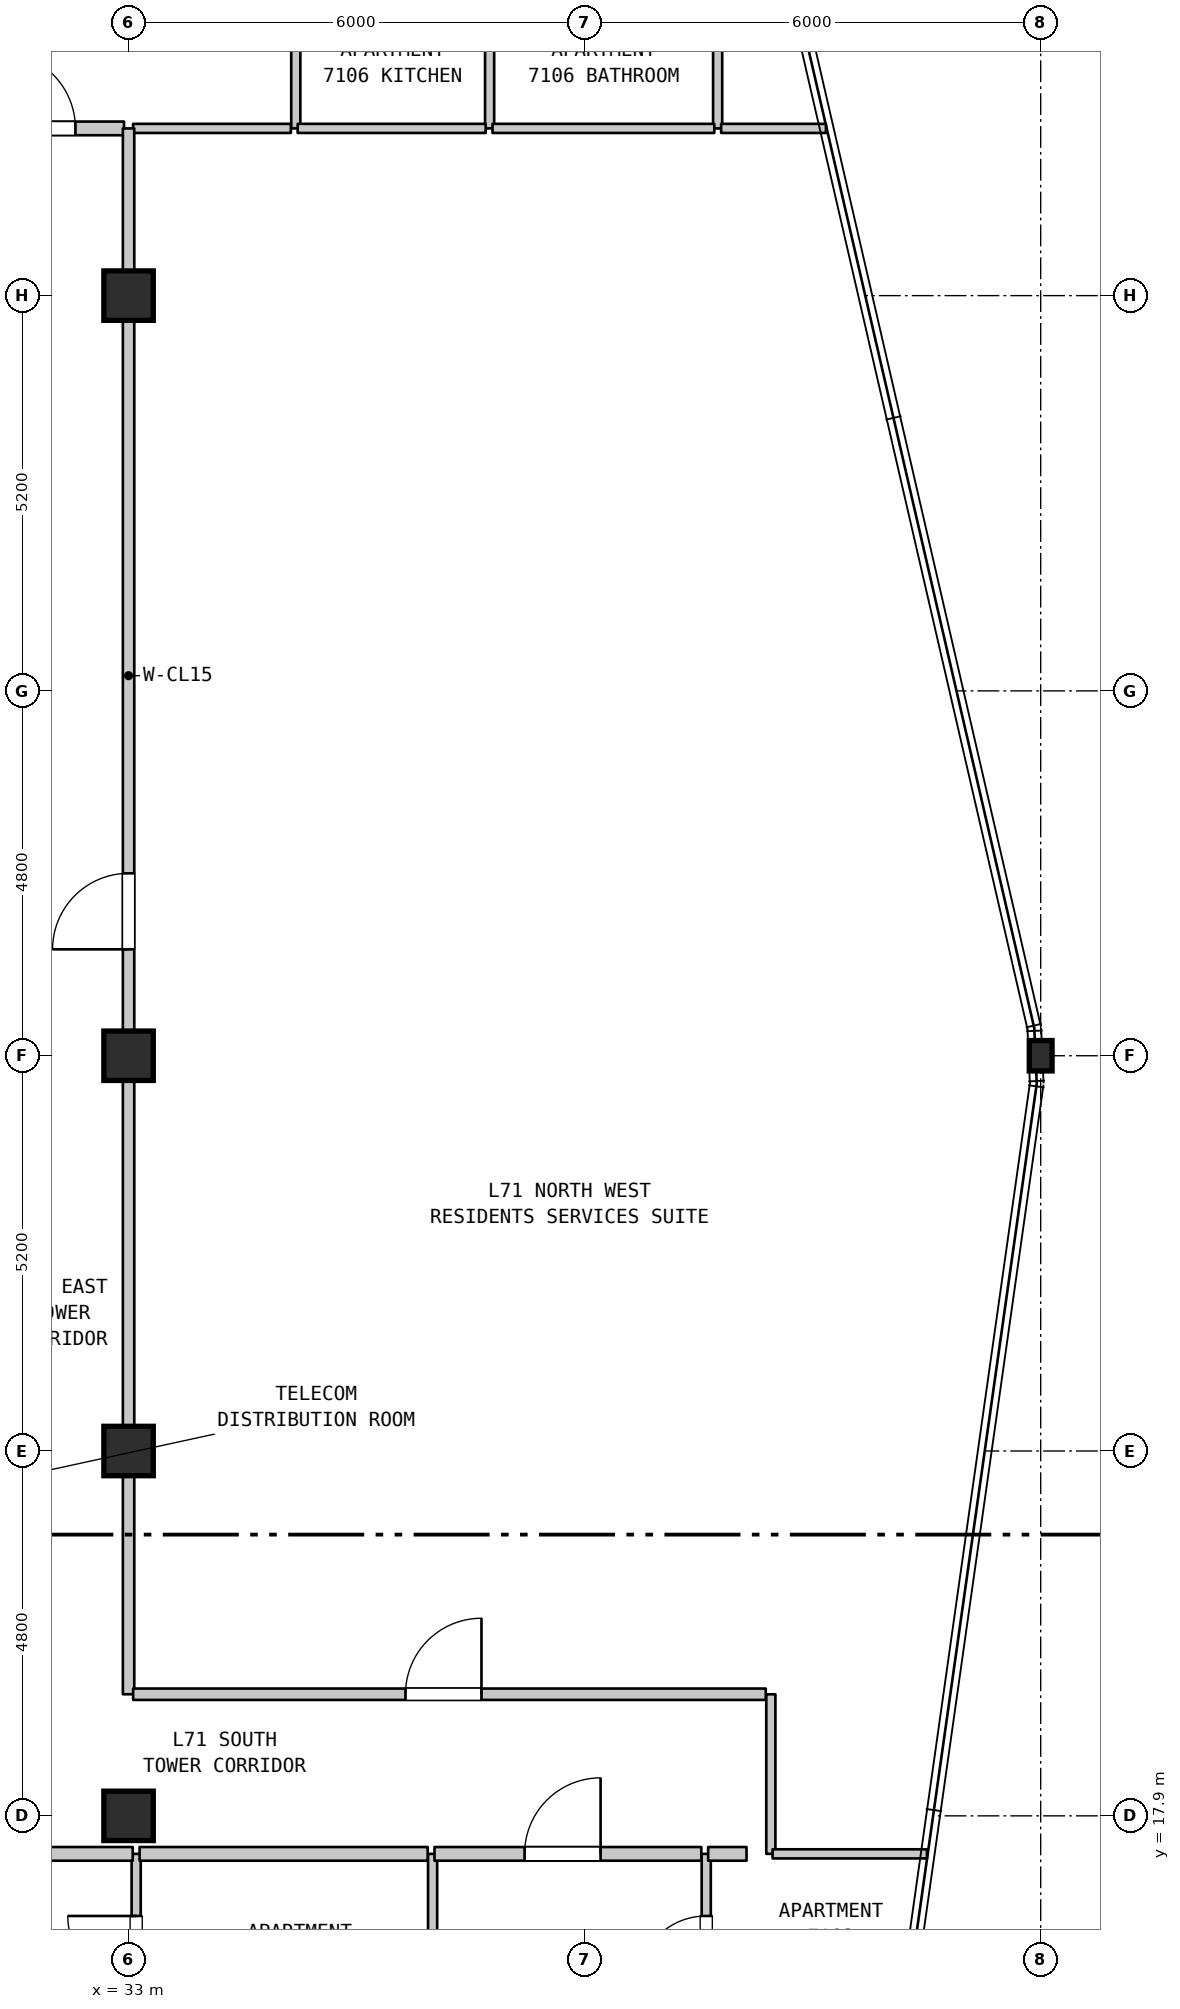
"""IFC4 building model, lengths in metres.
Left out: names, types, materials, properties, quantities, classifications, styles, units other than length and angle.
Written with IfcOpenShell. Run it as: python <this file> out.ifc"""

import sys

from ifc_helpers import new_model, si_unit, direction, frame, frame_2d, origin, origin_2d, place, context, subcontext, project, spatial, rectangle, i_section, extrude, element, fill, save


model = new_model("IFC4")
c1 = context("Model", 3, precision=1e-05, world=origin(), true_north=direction((0.0, 1.0)))
c2 = subcontext(c1, "Body", "Model", "MODEL_VIEW")
j1 = project(units=[si_unit("LENGTHUNIT", "METRE"), si_unit("PLANEANGLEUNIT", "RADIAN")], contexts=[c1])
p1 = place(None, origin())
s1 = spatial("IfcSite", under=j1, at=p1, CompositionType="ELEMENT")
p2 = place(p1, origin())
s2 = spatial("IfcBuilding", under=s1, at=p2, CompositionType="ELEMENT")
p3 = place(p2, frame((0.0, 0.0, 284.3)))
s3 = spatial("IfcBuildingStorey", under=s2, at=p3, CompositionType="ELEMENT", Elevation=284.3)
for number, where, z_axis, x_axis in (
    (1, (33.0, 17.9, 0.0), (0.0, 0.0, 1.0), (1.0, 0.0, 0.0)),
    (2, (33.0, 22.7, 0.0), (0.0, 0.0, 1.0), (1.0, 0.0, 0.0)),
    (3, (33.0, 27.9, 0.0), (0.0, 0.0, 1.0), (1.0, 0.0, 0.0)),
    (4, (33.0, 37.9, 0.0), (0.0, 0.0, 1.0), (1.0, 0.0, 0.0)),
):
    element("IfcColumn", number, at=place(p3, frame(where, z_axis=z_axis, x_axis=x_axis)), inside=s3, PredefinedType="COLUMN", context=c2, shape_type="SweptSolid", body=[
        extrude(rectangle(XDim=0.65, YDim=0.65, at=origin_2d()), origin(), (0.0, 0.0, 1.0), 3.7),
    ])
p4 = place(p3, frame((45.0, 27.9, 0.0), z_axis=(0.0, 0.0, 1.0), x_axis=(1.0, 0.0, 0.0)))
e5 = element("IfcColumn", 5, at=p4, inside=s3, PredefinedType="COLUMN", context=c2, shape_type="SweptSolid", body=[
    extrude(i_section(OverallWidth=0.3, OverallDepth=0.4, WebThickness=0.013, FlangeThickness=0.024, FilletRadius=0.027, at=origin_2d()), origin(), (0.0, 0.0, 1.0), 3.7),
])
p5 = place(p3, frame((33.0, 19.5, 0.0), z_axis=(0.0, 0.0, 1.0), x_axis=(0.0, 1.0, 0.0)))
e6 = element("IfcWall", 6, at=p5, inside=s3, PredefinedType="STANDARD", context=c2, shape_type="SweptSolid", body=[
    extrude(rectangle(XDim=8.4, YDim=0.15, at=frame_2d((4.2, 0.0))), origin(), (0.0, 0.0, 1.0), 3.1),
])
p6 = place(p3, frame((33.1, 15.008, 0.0), z_axis=(0.0, 0.0, 1.0), x_axis=(0.0, 1.0, 0.0)))
e7 = element("IfcWall", 7, at=p6, inside=s3, PredefinedType="PARTITIONING", context=c2, shape_type="SweptSolid", body=[
    extrude(rectangle(XDim=2.392, YDim=0.12, at=frame_2d((1.196, 0.0))), origin(), (0.0, 0.0, 1.0), 3.1),
])
p7 = place(p6, frame((0.675, 0.0, 0.0)))
e8 = element("IfcOpeningElement", 8, at=p7, cuts=e7, PredefinedType="OPENING", context=c2, shape_type="SweptSolid", body=[
    extrude(rectangle(XDim=0.9, YDim=2.1, at=frame_2d((0.45, 1.05))), frame((0.0, 0.07, 0.0), z_axis=(0.0, -1.0, 0.0), x_axis=(1.0, 0.0, 0.0)), (0.0, 0.0, 1.0), 0.14),
])
p8 = place(p3, frame((35.2, 40.1, 0.0), z_axis=(0.0, 0.0, 1.0), x_axis=(0.0, 1.0, 0.0)))
e9 = element("IfcWall", 9, at=p8, inside=s3, PredefinedType="PARTITIONING", context=c2, shape_type="SweptSolid", body=[
    extrude(rectangle(XDim=2.3, YDim=0.12, at=frame_2d((1.15, 0.0))), origin(), (0.0, 0.0, 1.0), 3.39),
])
p9 = place(p3, frame((37.0, 15.008, 0.0), z_axis=(0.0, 0.0, 1.0), x_axis=(0.0, 1.0, 0.0)))
e10 = element("IfcWall", 10, at=p9, inside=s3, PredefinedType="PARTITIONING", context=c2, shape_type="SweptSolid", body=[
    extrude(rectangle(XDim=2.392, YDim=0.12, at=frame_2d((1.196, 0.0))), origin(), (0.0, 0.0, 1.0), 3.39),
])
p10 = place(p3, frame((37.75, 40.1, 0.0), z_axis=(0.0, 0.0, 1.0), x_axis=(0.0, 1.0, 0.0)))
e11 = element("IfcWall", 11, at=p10, inside=s3, PredefinedType="PARTITIONING", context=c2, shape_type="SweptSolid", body=[
    extrude(rectangle(XDim=2.3, YDim=0.12, at=frame_2d((1.15, 0.0))), origin(), (0.0, 0.0, 1.0), 3.39),
])
p11 = place(p3, frame((40.6, 15.008, 0.0), z_axis=(0.0, 0.0, 1.0), x_axis=(0.0, 1.0, 0.0)))
e12 = element("IfcWall", 12, at=p11, inside=s3, PredefinedType="PARTITIONING", context=c2, shape_type="SweptSolid", body=[
    extrude(rectangle(XDim=2.392, YDim=0.12, at=frame_2d((1.196, 0.0))), origin(), (0.0, 0.0, 1.0), 3.39),
])
p12 = place(p11, frame((0.675, 0.0, 0.0)))
e13 = element("IfcOpeningElement", 13, at=p12, cuts=e12, PredefinedType="OPENING", context=c2, shape_type="SweptSolid", body=[
    extrude(rectangle(XDim=0.9, YDim=2.1, at=frame_2d((0.45, 1.05))), frame((0.0, 0.07, 0.0), z_axis=(0.0, -1.0, 0.0), x_axis=(1.0, 0.0, 0.0)), (0.0, 0.0, 1.0), 0.14),
])
p13 = place(p3, frame((40.75, 40.1, 0.0), z_axis=(0.0, 0.0, 1.0), x_axis=(0.0, 1.0, 0.0)))
e14 = element("IfcWall", 14, at=p13, inside=s3, PredefinedType="PARTITIONING", context=c2, shape_type="SweptSolid", body=[
    extrude(rectangle(XDim=2.3, YDim=0.12, at=frame_2d((1.15, 0.0))), origin(), (0.0, 0.0, 1.0), 3.39),
])
p14 = place(p3, frame((41.45, 17.4, 0.0), z_axis=(0.0, 0.0, 1.0), x_axis=(0.0, 1.0, 0.0)))
e15 = element("IfcWall", 15, at=p14, inside=s3, PredefinedType="PARTITIONING", context=c2, shape_type="SweptSolid", body=[
    extrude(rectangle(XDim=2.099, YDim=0.12, at=frame_2d((1.05, 0.0))), origin(), (0.0, 0.0, 1.0), 3.39),
])
p15 = place(p3, frame((29.545, 17.4, 0.0), z_axis=(0.0, 0.0, 1.0), x_axis=(1.0, 0.0, 0.0)))
e16 = element("IfcWall", 16, at=p15, inside=s3, PredefinedType="STANDARD", context=c2, shape_type="SweptSolid", body=[
    extrude(rectangle(XDim=3.51, YDim=0.18, at=frame_2d((1.755, 0.0))), origin(), (0.0, 0.0, 1.0), 3.39),
])
p16 = place(p15, frame((1.185, 0.0, 0.0)))
e17 = element("IfcOpeningElement", 17, at=p16, cuts=e16, PredefinedType="OPENING", context=c2, shape_type="SweptSolid", body=[
    extrude(rectangle(XDim=1.0, YDim=2.15, at=frame_2d((0.5, 1.075))), frame((0.0, 0.1, 0.0), z_axis=(0.0, -1.0, 0.0), x_axis=(1.0, 0.0, 0.0)), (0.0, 0.0, 1.0), 0.2),
])
p17 = place(p3, frame((33.145, 17.4, 0.0), z_axis=(0.0, 0.0, 1.0), x_axis=(1.0, 0.0, 0.0)))
e18 = element("IfcWall", 18, at=p17, inside=s3, PredefinedType="STANDARD", context=c2, shape_type="SweptSolid", body=[
    extrude(rectangle(XDim=3.79, YDim=0.18, at=frame_2d((1.895, 0.0))), origin(), (0.0, 0.0, 1.0), 3.39),
])
p18 = place(p3, frame((37.025, 17.4, 0.0), z_axis=(0.0, 0.0, 1.0), x_axis=(1.0, 0.0, 0.0)))
e19 = element("IfcWall", 19, at=p18, inside=s3, PredefinedType="STANDARD", context=c2, shape_type="SweptSolid", body=[
    extrude(rectangle(XDim=3.51, YDim=0.18, at=frame_2d((1.755, 0.0))), origin(), (0.0, 0.0, 1.0), 3.39),
])
p19 = place(p18, frame((1.185, 0.0, 0.0)))
e20 = element("IfcOpeningElement", 20, at=p19, cuts=e19, PredefinedType="OPENING", context=c2, shape_type="SweptSolid", body=[
    extrude(rectangle(XDim=1.0, YDim=2.15, at=frame_2d((0.5, 1.075))), frame((0.0, 0.1, 0.0), z_axis=(0.0, -1.0, 0.0), x_axis=(1.0, 0.0, 0.0)), (0.0, 0.0, 1.0), 0.2),
])
p20 = place(p3, frame((40.625, 17.4, 0.0), z_axis=(0.0, 0.0, 1.0), x_axis=(1.0, 0.0, 0.0)))
e21 = element("IfcWall", 21, at=p20, inside=s3, PredefinedType="STANDARD", context=c2, shape_type="SweptSolid", body=[
    extrude(rectangle(XDim=0.505, YDim=0.18, at=frame_2d((0.252, 0.0))), origin(), (0.0, 0.0, 1.0), 3.39),
])
p21 = place(p3, frame((41.473, 17.4, 0.0), z_axis=(0.0, 0.0, 1.0), x_axis=(1.0, 0.0, 0.0)))
e22 = element("IfcWall", 22, at=p21, inside=s3, PredefinedType="PARTITIONING", context=c2, shape_type="SweptSolid", body=[
    extrude(rectangle(XDim=2.031, YDim=0.12, at=frame_2d((1.016, 0.0))), origin(), (0.0, 0.0, 1.0), 3.39),
])
p22 = place(p3, frame((33.06, 19.5, 0.0), z_axis=(0.0, 0.0, 1.0), x_axis=(1.0, 0.0, 0.0)))
e23 = element("IfcWall", 23, at=p22, inside=s3, PredefinedType="STANDARD", context=c2, shape_type="SweptSolid", body=[
    extrude(rectangle(XDim=8.323, YDim=0.15, at=frame_2d((4.162, 0.0))), origin(), (0.0, 0.0, 1.0), 3.39),
])
p23 = place(p22, frame((3.583, 0.0, 0.0)))
e24 = element("IfcOpeningElement", 24, at=p23, cuts=e23, PredefinedType="OPENING", context=c2, shape_type="SweptSolid", body=[
    extrude(rectangle(XDim=1.0, YDim=2.15, at=frame_2d((0.5, 1.075))), frame((0.0, 0.085, 0.0), z_axis=(0.0, -1.0, 0.0), x_axis=(1.0, 0.0, 0.0)), (0.0, 0.0, 1.0), 0.17),
])
p24 = place(p3, frame((30.395, 40.1, 0.0), z_axis=(0.0, 0.0, 1.0), x_axis=(1.0, 0.0, 0.0)))
e25 = element("IfcWall", 25, at=p24, inside=s3, PredefinedType="STANDARD", context=c2, shape_type="SweptSolid", body=[
    extrude(rectangle(XDim=2.545, YDim=0.18, at=frame_2d((1.272, 0.0))), origin(), (0.0, 0.0, 1.0), 3.39),
])
p25 = place(p24, frame((0.906, 0.0, 0.0)))
e26 = element("IfcOpeningElement", 26, at=p25, cuts=e25, PredefinedType="OPENING", context=c2, shape_type="SweptSolid", body=[
    extrude(rectangle(XDim=1.0, YDim=2.15, at=frame_2d((0.5, 1.075))), frame((0.0, 0.1, 0.0), z_axis=(0.0, -1.0, 0.0), x_axis=(1.0, 0.0, 0.0)), (0.0, 0.0, 1.0), 0.2),
])
p26 = place(p3, frame((33.06, 40.1, 0.0), z_axis=(0.0, 0.0, 1.0), x_axis=(1.0, 0.0, 0.0)))
e27 = element("IfcWall", 27, at=p26, inside=s3, PredefinedType="PARTITIONING", context=c2, shape_type="SweptSolid", body=[
    extrude(rectangle(XDim=2.075, YDim=0.12, at=frame_2d((1.038, 0.0))), origin(), (0.0, 0.0, 1.0), 3.39),
])
p27 = place(p3, frame((35.225, 40.1, 0.0), z_axis=(0.0, 0.0, 1.0), x_axis=(1.0, 0.0, 0.0)))
e28 = element("IfcWall", 28, at=p27, inside=s3, PredefinedType="PARTITIONING", context=c2, shape_type="SweptSolid", body=[
    extrude(rectangle(XDim=2.473, YDim=0.12, at=frame_2d((1.236, 0.0))), origin(), (0.0, 0.0, 1.0), 3.39),
])
p28 = place(p3, frame((37.788, 40.1, 0.0), z_axis=(0.0, 0.0, 1.0), x_axis=(1.0, 0.0, 0.0)))
e29 = element("IfcWall", 29, at=p28, inside=s3, PredefinedType="PARTITIONING", context=c2, shape_type="SweptSolid", body=[
    extrude(rectangle(XDim=2.918, YDim=0.12, at=frame_2d((1.459, 0.0))), origin(), (0.0, 0.0, 1.0), 3.39),
])
p29 = place(p3, frame((40.796, 40.1, 0.0), z_axis=(0.0, 0.0, 1.0), x_axis=(1.0, 0.0, 0.0)))
e30 = element("IfcWall", 30, at=p29, inside=s3, PredefinedType="PARTITIONING", context=c2, shape_type="SweptSolid", body=[
    extrude(rectangle(XDim=1.379, YDim=0.12, at=frame_2d((0.689, 0.0))), origin(), (0.0, 0.0, 1.0), 3.39),
])
p30 = place(p3, frame((33.0, 27.9, 0.0), z_axis=(0.0, 0.0, 1.0), x_axis=(0.0, 1.0, 0.0)))
e31 = element("IfcWall", 31, at=p30, inside=s3, PredefinedType="STANDARD", context=c2, shape_type="SweptSolid", body=[
    extrude(rectangle(XDim=10.0, YDim=0.15, at=frame_2d((5.0, 0.0))), origin(), (0.0, 0.0, 1.0), 2.89),
])
p31 = place(p30, frame((1.4, 0.0, 0.0)))
e32 = element("IfcOpeningElement", 32, at=p31, cuts=e31, PredefinedType="OPENING", context=c2, shape_type="SweptSolid", body=[
    extrude(rectangle(XDim=1.0, YDim=2.15, at=frame_2d((0.5, 1.075))), frame((0.0, 0.085, 0.0), z_axis=(0.0, -1.0, 0.0), x_axis=(1.0, 0.0, 0.0)), (0.0, 0.0, 1.0), 0.17),
])
p32 = place(p3, frame((33.0, 37.9, 0.0), z_axis=(0.0, 0.0, 1.0), x_axis=(0.0, 1.0, 0.0)))
e33 = element("IfcWall", 33, at=p32, inside=s3, PredefinedType="STANDARD", context=c2, shape_type="SweptSolid", body=[
    extrude(rectangle(XDim=2.2, YDim=0.15, at=frame_2d((1.1, 0.0))), origin(), (0.0, 0.0, 1.0), 2.79),
])
p33 = place(p31, origin())
e34 = element("IfcDoor", 34, at=p33, inside=s3, OperationType="SINGLE_SWING_LEFT", PredefinedType="DOOR", context=c2, shape_type="SweptSolid", body=[
    extrude(rectangle(XDim=1.0, YDim=2.15, at=frame_2d((0.5, 1.075))), frame((0.0, 0.025, 0.0), z_axis=(0.0, -1.0, 0.0), x_axis=(1.0, 0.0, 0.0)), (0.0, 0.0, 1.0), 0.05),
])
fill(e32, e34)
p34 = place(p7, origin())
e35 = element("IfcDoor", 35, at=p34, inside=s3, OperationType="SINGLE_SWING_RIGHT", PredefinedType="DOOR", context=c2, shape_type="SweptSolid", body=[
    extrude(rectangle(XDim=0.9, YDim=2.1, at=frame_2d((0.45, 1.05))), frame((0.0, 0.025, 0.0), z_axis=(0.0, -1.0, 0.0), x_axis=(1.0, 0.0, 0.0)), (0.0, 0.0, 1.0), 0.05),
])
fill(e8, e35)
p35 = place(p12, origin())
e36 = element("IfcDoor", 36, at=p35, inside=s3, OperationType="SINGLE_SWING_LEFT", PredefinedType="DOOR", context=c2, shape_type="SweptSolid", body=[
    extrude(rectangle(XDim=0.9, YDim=2.1, at=frame_2d((0.45, 1.05))), frame((0.0, 0.025, 0.0), z_axis=(0.0, -1.0, 0.0), x_axis=(1.0, 0.0, 0.0)), (0.0, 0.0, 1.0), 0.05),
])
fill(e13, e36)
p36 = place(p19, origin())
e37 = element("IfcDoor", 37, at=p36, inside=s3, OperationType="SINGLE_SWING_RIGHT", PredefinedType="DOOR", context=c2, shape_type="SweptSolid", body=[
    extrude(rectangle(XDim=1.0, YDim=2.15, at=frame_2d((0.5, 1.075))), frame((0.0, 0.025, 0.0), z_axis=(0.0, -1.0, 0.0), x_axis=(1.0, 0.0, 0.0)), (0.0, 0.0, 1.0), 0.05),
])
fill(e20, e37)
p37 = place(p23, origin())
e38 = element("IfcDoor", 38, at=p37, inside=s3, OperationType="SINGLE_SWING_RIGHT", PredefinedType="DOOR", context=c2, shape_type="SweptSolid", body=[
    extrude(rectangle(XDim=1.0, YDim=2.15, at=frame_2d((0.5, 1.075))), frame((0.0, 0.025, 0.0), z_axis=(0.0, -1.0, 0.0), x_axis=(1.0, 0.0, 0.0)), (0.0, 0.0, 1.0), 0.05),
])
fill(e24, e38)
p38 = place(p25, origin())
e39 = element("IfcDoor", 39, at=p38, inside=s3, OperationType="SINGLE_SWING_LEFT", PredefinedType="DOOR", context=c2, shape_type="SweptSolid", body=[
    extrude(rectangle(XDim=1.0, YDim=2.15, at=frame_2d((0.5, 1.075))), frame((0.0, 0.025, 0.0), z_axis=(0.0, -1.0, 0.0), x_axis=(1.0, 0.0, 0.0)), (0.0, 0.0, 1.0), 0.05),
])
fill(e26, e39)
save(model, sys.argv[1])
